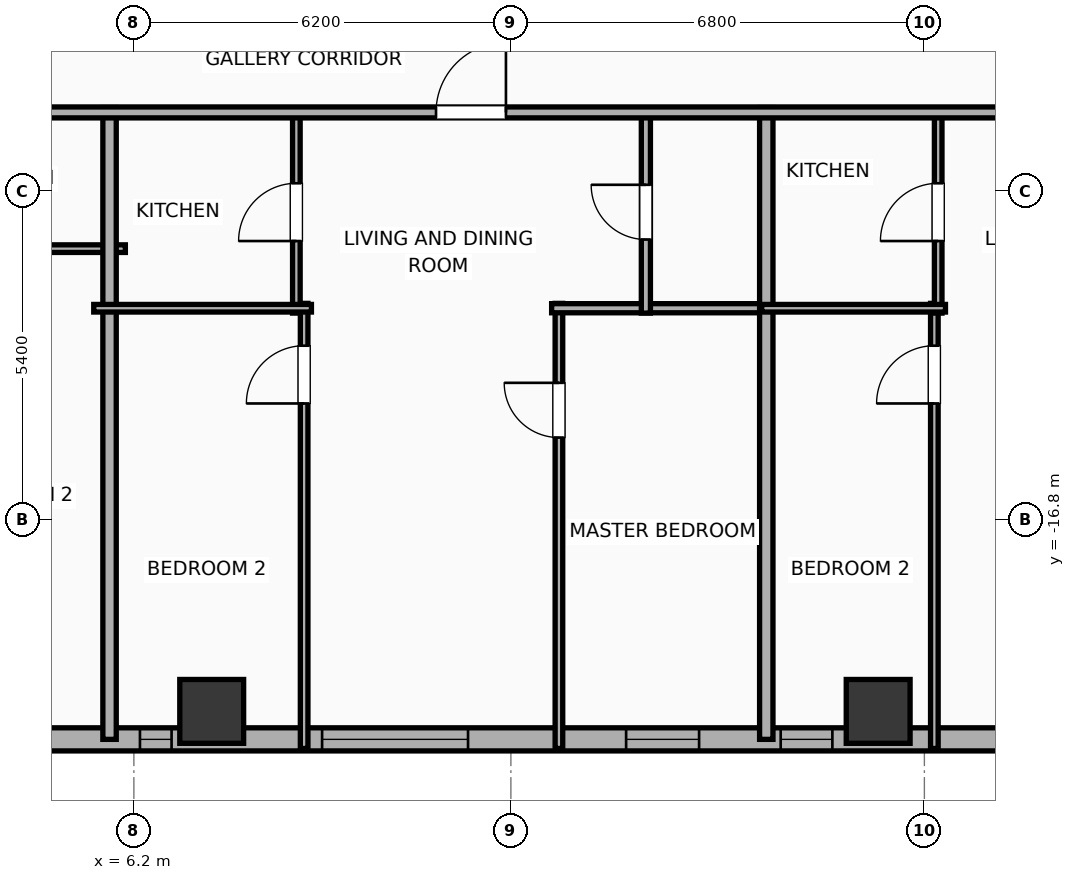
"""IFC4 building model, lengths in metres.
Left out: names, types, materials, properties, quantities, classifications, styles, units other than length and angle.
Written with IfcOpenShell. Run it as: python <this file> out.ifc"""

import sys

from ifc_helpers import new_model, si_unit, direction, frame, frame_2d, origin, origin_2d, place, context, subcontext, project, spatial, rectangle, hollow_rectangle, extrude, element, fill, save


model = new_model("IFC4")
c1 = context("Model", 3, precision=1e-05, world=origin(), true_north=direction((0.0, 1.0)))
c2 = subcontext(c1, "Body", "Model", "MODEL_VIEW")
j1 = project(units=[si_unit("LENGTHUNIT", "METRE"), si_unit("PLANEANGLEUNIT", "RADIAN")], contexts=[c1])
p1 = place(None, origin())
s1 = spatial("IfcSite", under=j1, at=p1, CompositionType="ELEMENT")
p2 = place(p1, origin())
s2 = spatial("IfcBuilding", under=s1, at=p2, CompositionType="ELEMENT")
p3 = place(p2, frame((0.0, 0.0, 105.3)))
s3 = spatial("IfcBuildingStorey", under=s2, at=p3, CompositionType="ELEMENT", Elevation=105.3)
for number, where, z_axis, x_axis in (
    (1, (7.48, -19.95, 0.0), (0.0, 0.0, 1.0), (1.0, 0.0, 0.0)),
    (2, (18.44, -19.95, 0.0), (0.0, 0.0, 1.0), (1.0, 0.0, 0.0)),
):
    element("IfcColumn", number, at=place(p3, frame(where, z_axis=z_axis, x_axis=x_axis)), inside=s3, PredefinedType="COLUMN", context=c2, shape_type="SweptSolid", body=[
        extrude(hollow_rectangle(XDim=1.05, YDim=1.05, WallThickness=0.036, at=origin_2d()), origin(), (0.0, 0.0, 1.0), 3.9),
    ])
p4 = place(p3, frame((29.381, -20.41, 0.0), z_axis=(0.0, 0.0, 1.0), x_axis=(-1.0, 0.0, 0.0)))
e3 = element("IfcWall", 3, at=p4, inside=s3, PredefinedType="ELEMENTEDWALL", context=c2, shape_type="SweptSolid", body=[
    extrude(rectangle(XDim=54.763, YDim=0.38, at=frame_2d((27.381, 0.0))), origin(), (0.0, 0.0, 1.0), 3.65),
])
p5 = place(p4, frame((6.495, 0.0, 0.75)))
e4 = element("IfcOpeningElement", 4, at=p5, cuts=e3, PredefinedType="OPENING", context=c2, shape_type="SweptSolid", body=[
    extrude(rectangle(XDim=2.4, YDim=2.1, at=frame_2d((1.2, 1.05))), frame((0.0, 0.2, 0.0), z_axis=(0.0, -1.0, 0.0), x_axis=(1.0, 0.0, 0.0)), (0.0, 0.0, 1.0), 0.4),
])
p6 = place(p4, frame((17.686, 0.0, 0.75)))
e5 = element("IfcOpeningElement", 5, at=p6, cuts=e3, PredefinedType="OPENING", context=c2, shape_type="SweptSolid", body=[
    extrude(rectangle(XDim=2.4, YDim=2.1, at=frame_2d((1.2, 1.05))), frame((0.0, 0.2, 0.0), z_axis=(0.0, -1.0, 0.0), x_axis=(1.0, 0.0, 0.0)), (0.0, 0.0, 1.0), 0.4),
])
p7 = place(p4, frame((34.677, 0.0, 0.75)))
e6 = element("IfcOpeningElement", 6, at=p7, cuts=e3, PredefinedType="OPENING", context=c2, shape_type="SweptSolid", body=[
    extrude(rectangle(XDim=2.4, YDim=2.1, at=frame_2d((1.2, 1.05))), frame((0.0, 0.2, 0.0), z_axis=(0.0, -1.0, 0.0), x_axis=(1.0, 0.0, 0.0)), (0.0, 0.0, 1.0), 0.4),
])
p8 = place(p4, frame((45.867, 0.0, 0.75)))
e7 = element("IfcOpeningElement", 7, at=p8, cuts=e3, PredefinedType="OPENING", context=c2, shape_type="SweptSolid", body=[
    extrude(rectangle(XDim=2.4, YDim=2.1, at=frame_2d((1.2, 1.05))), frame((0.0, 0.2, 0.0), z_axis=(0.0, -1.0, 0.0), x_axis=(1.0, 0.0, 0.0)), (0.0, 0.0, 1.0), 0.4),
])
p9 = place(p4, frame((52.281, 0.0, 0.75)))
e8 = element("IfcOpeningElement", 8, at=p9, cuts=e3, PredefinedType="OPENING", context=c2, shape_type="SweptSolid", body=[
    extrude(rectangle(XDim=1.2, YDim=2.05, at=frame_2d((0.6, 1.025))), frame((0.0, 0.2, 0.0), z_axis=(0.0, -1.0, 0.0), x_axis=(1.0, 0.0, 0.0)), (0.0, 0.0, 1.0), 0.4),
])
p10 = place(p4, frame((49.641, 0.0, 0.75)))
e9 = element("IfcOpeningElement", 9, at=p10, cuts=e3, PredefinedType="OPENING", context=c2, shape_type="SweptSolid", body=[
    extrude(rectangle(XDim=1.2, YDim=2.05, at=frame_2d((0.6, 1.025))), frame((0.0, 0.2, 0.0), z_axis=(0.0, -1.0, 0.0), x_axis=(1.0, 0.0, 0.0)), (0.0, 0.0, 1.0), 0.4),
])
p11 = place(p4, frame((39.543, 0.0, 0.75)))
e10 = element("IfcOpeningElement", 10, at=p11, cuts=e3, PredefinedType="OPENING", context=c2, shape_type="SweptSolid", body=[
    extrude(rectangle(XDim=1.2, YDim=2.05, at=frame_2d((0.6, 1.025))), frame((0.0, 0.2, 0.0), z_axis=(0.0, -1.0, 0.0), x_axis=(1.0, 0.0, 0.0)), (0.0, 0.0, 1.0), 0.4),
])
p12 = place(p4, frame((44.538, 0.0, 0.75)))
e11 = element("IfcOpeningElement", 11, at=p12, cuts=e3, PredefinedType="OPENING", context=c2, shape_type="SweptSolid", body=[
    extrude(rectangle(XDim=0.52, YDim=2.05, at=frame_2d((0.26, 1.025))), frame((0.0, 0.2, 0.0), z_axis=(0.0, -1.0, 0.0), x_axis=(1.0, 0.0, 0.0)), (0.0, 0.0, 1.0), 0.4),
])
p13 = place(p4, frame((28.206, 0.0, 0.75)))
e12 = element("IfcOpeningElement", 12, at=p13, cuts=e3, PredefinedType="OPENING", context=c2, shape_type="SweptSolid", body=[
    extrude(rectangle(XDim=1.2, YDim=2.05, at=frame_2d((0.6, 1.025))), frame((0.0, 0.2, 0.0), z_axis=(0.0, -1.0, 0.0), x_axis=(1.0, 0.0, 0.0)), (0.0, 0.0, 1.0), 0.4),
])
p14 = place(p4, frame((31.241, 0.0, 0.75)))
e13 = element("IfcOpeningElement", 13, at=p14, cuts=e3, PredefinedType="OPENING", context=c2, shape_type="SweptSolid", body=[
    extrude(rectangle(XDim=0.85, YDim=2.05, at=frame_2d((0.425, 1.025))), frame((0.0, 0.2, 0.0), z_axis=(0.0, -1.0, 0.0), x_axis=(1.0, 0.0, 0.0)), (0.0, 0.0, 1.0), 0.4),
])
p15 = place(p4, frame((24.561, 0.0, 0.75)))
e14 = element("IfcOpeningElement", 14, at=p15, cuts=e3, PredefinedType="OPENING", context=c2, shape_type="SweptSolid", body=[
    extrude(rectangle(XDim=1.2, YDim=2.05, at=frame_2d((0.6, 1.025))), frame((0.0, 0.2, 0.0), z_axis=(0.0, -1.0, 0.0), x_axis=(1.0, 0.0, 0.0)), (0.0, 0.0, 1.0), 0.4),
])
p16 = place(p4, frame((22.561, 0.0, 0.75)))
e15 = element("IfcOpeningElement", 15, at=p16, cuts=e3, PredefinedType="OPENING", context=c2, shape_type="SweptSolid", body=[
    extrude(rectangle(XDim=0.52, YDim=2.05, at=frame_2d((0.26, 1.025))), frame((0.0, 0.2, 0.0), z_axis=(0.0, -1.0, 0.0), x_axis=(1.0, 0.0, 0.0)), (0.0, 0.0, 1.0), 0.4),
])
p17 = place(p4, frame((13.886, 0.0, 0.75)))
e16 = element("IfcOpeningElement", 16, at=p17, cuts=e3, PredefinedType="OPENING", context=c2, shape_type="SweptSolid", body=[
    extrude(rectangle(XDim=1.2, YDim=2.05, at=frame_2d((0.6, 1.025))), frame((0.0, 0.2, 0.0), z_axis=(0.0, -1.0, 0.0), x_axis=(1.0, 0.0, 0.0)), (0.0, 0.0, 1.0), 0.4),
])
p18 = place(p4, frame((11.694, 0.0, 0.75)))
e17 = element("IfcOpeningElement", 17, at=p18, cuts=e3, PredefinedType="OPENING", context=c2, shape_type="SweptSolid", body=[
    extrude(rectangle(XDim=0.85, YDim=2.05, at=frame_2d((0.425, 1.025))), frame((0.0, 0.2, 0.0), z_axis=(0.0, -1.0, 0.0), x_axis=(1.0, 0.0, 0.0)), (0.0, 0.0, 1.0), 0.4),
])
p19 = place(p4, frame((3.286, 0.0, 0.75)))
e18 = element("IfcOpeningElement", 18, at=p19, cuts=e3, PredefinedType="OPENING", context=c2, shape_type="SweptSolid", body=[
    extrude(rectangle(XDim=1.2, YDim=2.05, at=frame_2d((0.6, 1.025))), frame((0.0, 0.2, 0.0), z_axis=(0.0, -1.0, 0.0), x_axis=(1.0, 0.0, 0.0)), (0.0, 0.0, 1.0), 0.4),
])
p20 = place(p4, frame((0.816, 0.0, 0.75)))
e19 = element("IfcOpeningElement", 19, at=p20, cuts=e3, PredefinedType="OPENING", context=c2, shape_type="SweptSolid", body=[
    extrude(rectangle(XDim=1.2, YDim=2.05, at=frame_2d((0.6, 1.025))), frame((0.0, 0.2, 0.0), z_axis=(0.0, -1.0, 0.0), x_axis=(1.0, 0.0, 0.0)), (0.0, 0.0, 1.0), 0.4),
])
p21 = place(p3, frame((2.56, -12.34, 0.0), z_axis=(0.0, 0.0, 1.0), x_axis=(1.0, 0.0, 0.0)))
e20 = element("IfcWall", 20, at=p21, inside=s3, PredefinedType="PARTITIONING", context=c2, shape_type="SweptSolid", body=[
    extrude(rectangle(XDim=3.5, YDim=0.125, at=frame_2d((1.75, 0.0))), origin(), (0.0, 0.0, 1.0), 3.65),
])
p22 = place(p3, frame((5.8, -20.41, 0.0), z_axis=(0.0, 0.0, 1.0), x_axis=(0.0, 1.0, 0.0)))
e21 = element("IfcWall", 21, at=p22, inside=s3, PredefinedType="PARTITIONING", context=c2, shape_type="SweptSolid", body=[
    extrude(rectangle(XDim=10.39, YDim=0.22, at=frame_2d((5.195, 0.0))), origin(), (0.0, 0.0, 1.0), 3.04),
])
p23 = place(p3, frame((9.0, -20.56, 0.0), z_axis=(0.0, 0.0, 1.0), x_axis=(0.0, 1.0, 0.0)))
e22 = element("IfcWall", 22, at=p23, inside=s3, PredefinedType="PARTITIONING", context=c2, shape_type="SweptSolid", body=[
    extrude(rectangle(XDim=7.32, YDim=0.125, at=frame_2d((3.66, 0.0))), origin(), (0.0, 0.0, 1.0), 3.65),
])
p24 = place(p23, frame((5.674, 0.0, 0.0)))
e23 = element("IfcOpeningElement", 23, at=p24, cuts=e22, PredefinedType="OPENING", context=c2, shape_type="SweptSolid", body=[
    extrude(rectangle(XDim=0.95, YDim=2.05, at=frame_2d((0.475, 1.025))), frame((0.0, 0.073, 0.0), z_axis=(0.0, -1.0, 0.0), x_axis=(1.0, 0.0, 0.0)), (0.0, 0.0, 1.0), 0.145),
])
p25 = place(p3, frame((13.19, -20.56, 0.0), z_axis=(0.0, 0.0, 1.0), x_axis=(0.0, 1.0, 0.0)))
e24 = element("IfcWall", 24, at=p25, inside=s3, PredefinedType="PARTITIONING", context=c2, shape_type="SweptSolid", body=[
    extrude(rectangle(XDim=7.32, YDim=0.125, at=frame_2d((3.66, 0.0))), origin(), (0.0, 0.0, 1.0), 3.65),
])
p26 = place(p25, frame((5.113, 0.0, 0.0)))
e25 = element("IfcOpeningElement", 25, at=p26, cuts=e24, PredefinedType="OPENING", context=c2, shape_type="SweptSolid", body=[
    extrude(rectangle(XDim=0.9, YDim=2.05, at=frame_2d((0.45, 1.025))), frame((0.0, 0.073, 0.0), z_axis=(0.0, -1.0, 0.0), x_axis=(1.0, 0.0, 0.0)), (0.0, 0.0, 1.0), 0.145),
])
p27 = place(p3, frame((13.07, -13.32, 0.0), z_axis=(0.0, 0.0, 1.0), x_axis=(1.0, 0.0, 0.0)))
e26 = element("IfcWall", 26, at=p27, inside=s3, PredefinedType="PLUMBINGWALL", context=c2, shape_type="SweptSolid", body=[
    extrude(rectangle(XDim=3.605, YDim=0.15, at=frame_2d((1.802, 0.0))), origin(), (0.0, 0.0, 1.0), 3.65),
])
p28 = place(p3, frame((8.872, -13.4, 0.0), z_axis=(0.0, 0.0, 1.0), x_axis=(0.0, 1.0, 0.0)))
e27 = element("IfcWall", 27, at=p28, inside=s3, PredefinedType="PARTITIONING", context=c2, shape_type="SweptSolid", body=[
    extrude(rectangle(XDim=3.32, YDim=0.125, at=frame_2d((1.66, 0.0))), origin(), (0.0, 0.0, 1.0), 3.65),
])
p29 = place(p28, frame((1.185, 0.0, 0.0)))
e28 = element("IfcOpeningElement", 28, at=p29, cuts=e27, PredefinedType="OPENING", context=c2, shape_type="SweptSolid", body=[
    extrude(rectangle(XDim=0.95, YDim=2.05, at=frame_2d((0.475, 1.025))), frame((0.0, 0.073, 0.0), z_axis=(0.0, -1.0, 0.0), x_axis=(1.0, 0.0, 0.0)), (0.0, 0.0, 1.0), 0.145),
])
p30 = place(p3, frame((5.54, -13.32, 0.0), z_axis=(0.0, 0.0, 1.0), x_axis=(1.0, 0.0, 0.0)))
e29 = element("IfcWall", 29, at=p30, inside=s3, PredefinedType="PARTITIONING", context=c2, shape_type="SweptSolid", body=[
    extrude(rectangle(XDim=3.58, YDim=0.125, at=frame_2d((1.79, 0.0))), origin(), (0.0, 0.0, 1.0), 3.65),
])
p31 = place(p3, frame((14.62, -13.4, 0.0), z_axis=(0.0, 0.0, 1.0), x_axis=(0.0, 1.0, 0.0)))
e30 = element("IfcWall", 30, at=p31, inside=s3, PredefinedType="PLUMBINGWALL", context=c2, shape_type="SweptSolid", body=[
    extrude(rectangle(XDim=3.32, YDim=0.15, at=frame_2d((1.66, 0.0))), origin(), (0.0, 0.0, 1.0), 3.65),
])
p32 = place(p31, frame((1.21, 0.0, 0.0)))
e31 = element("IfcOpeningElement", 31, at=p32, cuts=e30, PredefinedType="OPENING", context=c2, shape_type="SweptSolid", body=[
    extrude(rectangle(XDim=0.9, YDim=2.05, at=frame_2d((0.45, 1.025))), frame((0.0, 0.085, 0.0), z_axis=(0.0, -1.0, 0.0), x_axis=(1.0, 0.0, 0.0)), (0.0, 0.0, 1.0), 0.17),
])
p33 = place(p3, frame((16.6, -20.41, 0.0), z_axis=(0.0, 0.0, 1.0), x_axis=(0.0, 1.0, 0.0)))
e32 = element("IfcWall", 32, at=p33, inside=s3, PredefinedType="PARTITIONING", context=c2, shape_type="SweptSolid", body=[
    extrude(rectangle(XDim=10.39, YDim=0.22, at=frame_2d((5.195, 0.0))), origin(), (0.0, 0.0, 1.0), 3.65),
])
p34 = place(p3, frame((19.364, -20.56, 0.0), z_axis=(0.0, 0.0, 1.0), x_axis=(0.0, 1.0, 0.0)))
e33 = element("IfcWall", 33, at=p34, inside=s3, PredefinedType="PARTITIONING", context=c2, shape_type="SweptSolid", body=[
    extrude(rectangle(XDim=7.32, YDim=0.125, at=frame_2d((3.66, 0.0))), origin(), (0.0, 0.0, 1.0), 3.65),
])
p35 = place(p34, frame((5.674, 0.0, 0.0)))
e34 = element("IfcOpeningElement", 34, at=p35, cuts=e33, PredefinedType="OPENING", context=c2, shape_type="SweptSolid", body=[
    extrude(rectangle(XDim=0.95, YDim=2.05, at=frame_2d((0.475, 1.025))), frame((0.0, 0.073, 0.0), z_axis=(0.0, -1.0, 0.0), x_axis=(1.0, 0.0, 0.0)), (0.0, 0.0, 1.0), 0.145),
])
p36 = place(p3, frame((19.427, -13.4, 0.0), z_axis=(0.0, 0.0, 1.0), x_axis=(0.0, 1.0, 0.0)))
e35 = element("IfcWall", 35, at=p36, inside=s3, PredefinedType="PARTITIONING", context=c2, shape_type="SweptSolid", body=[
    extrude(rectangle(XDim=3.32, YDim=0.125, at=frame_2d((1.66, 0.0))), origin(), (0.0, 0.0, 1.0), 3.65),
])
p37 = place(p36, frame((1.185, 0.0, 0.0)))
e36 = element("IfcOpeningElement", 36, at=p37, cuts=e35, PredefinedType="OPENING", context=c2, shape_type="SweptSolid", body=[
    extrude(rectangle(XDim=0.95, YDim=2.05, at=frame_2d((0.475, 1.025))), frame((0.0, 0.073, 0.0), z_axis=(0.0, -1.0, 0.0), x_axis=(1.0, 0.0, 0.0)), (0.0, 0.0, 1.0), 0.145),
])
p38 = place(p3, frame((16.525, -13.32, 0.0), z_axis=(0.0, 0.0, 1.0), x_axis=(1.0, 0.0, 0.0)))
e37 = element("IfcWall", 37, at=p38, inside=s3, PredefinedType="PARTITIONING", context=c2, shape_type="SweptSolid", body=[
    extrude(rectangle(XDim=3.022, YDim=0.125, at=frame_2d((1.511, 0.0))), origin(), (0.0, 0.0, 1.0), 3.65),
])
p39 = place(p3, frame((-29.21, -10.1, 0.0), z_axis=(0.0, 0.0, 1.0), x_axis=(1.0, 0.0, 0.0)))
e38 = element("IfcWall", 38, at=p39, inside=s3, PredefinedType="PARTITIONING", context=c2, shape_type="SweptSolid", body=[
    extrude(rectangle(XDim=62.42, YDim=0.18, at=frame_2d((31.21, 0.0))), origin(), (0.0, 0.0, 1.0), 3.65),
])
p40 = place(p39, frame((3.033, 0.0, 0.0)))
e39 = element("IfcOpeningElement", 39, at=p40, cuts=e38, PredefinedType="OPENING", context=c2, shape_type="SweptSolid", body=[
    extrude(rectangle(XDim=0.9, YDim=2.05, at=frame_2d((0.45, 1.025))), frame((0.0, 0.1, 0.0), z_axis=(0.0, -1.0, 0.0), x_axis=(1.0, 0.0, 0.0)), (0.0, 0.0, 1.0), 0.2),
])
p41 = place(p39, frame((9.768, 0.0, 0.0)))
e40 = element("IfcOpeningElement", 40, at=p41, cuts=e38, PredefinedType="OPENING", context=c2, shape_type="SweptSolid", body=[
    extrude(rectangle(XDim=0.9, YDim=2.05, at=frame_2d((0.45, 1.025))), frame((0.0, 0.1, 0.0), z_axis=(0.0, -1.0, 0.0), x_axis=(1.0, 0.0, 0.0)), (0.0, 0.0, 1.0), 0.2),
])
p42 = place(p39, frame((18.65, 0.0, 0.0)))
e41 = element("IfcOpeningElement", 41, at=p42, cuts=e38, PredefinedType="OPENING", context=c2, shape_type="SweptSolid", body=[
    extrude(rectangle(XDim=1.15, YDim=2.05, at=frame_2d((0.575, 1.025))), frame((0.0, 0.1, 0.0), z_axis=(0.0, -1.0, 0.0), x_axis=(1.0, 0.0, 0.0)), (0.0, 0.0, 1.0), 0.2),
])
p43 = place(p39, frame((29.212, 0.0, 0.0)))
e42 = element("IfcOpeningElement", 42, at=p43, cuts=e38, PredefinedType="OPENING", context=c2, shape_type="SweptSolid", body=[
    extrude(rectangle(XDim=1.15, YDim=2.05, at=frame_2d((0.575, 1.025))), frame((0.0, 0.1, 0.0), z_axis=(0.0, -1.0, 0.0), x_axis=(1.0, 0.0, 0.0)), (0.0, 0.0, 1.0), 0.2),
])
p44 = place(p39, frame((40.379, 0.0, 0.0)))
e43 = element("IfcOpeningElement", 43, at=p44, cuts=e38, PredefinedType="OPENING", context=c2, shape_type="SweptSolid", body=[
    extrude(rectangle(XDim=1.15, YDim=2.05, at=frame_2d((0.575, 1.025))), frame((0.0, 0.1, 0.0), z_axis=(0.0, -1.0, 0.0), x_axis=(1.0, 0.0, 0.0)), (0.0, 0.0, 1.0), 0.2),
])
p45 = place(p39, frame((50.959, 0.0, 0.0)))
e44 = element("IfcOpeningElement", 44, at=p45, cuts=e38, PredefinedType="OPENING", context=c2, shape_type="SweptSolid", body=[
    extrude(rectangle(XDim=1.15, YDim=2.05, at=frame_2d((0.575, 1.025))), frame((0.0, 0.1, 0.0), z_axis=(0.0, -1.0, 0.0), x_axis=(1.0, 0.0, 0.0)), (0.0, 0.0, 1.0), 0.2),
])
p46 = place(p39, frame((59.117, 0.0, 0.0)))
e45 = element("IfcOpeningElement", 45, at=p46, cuts=e38, PredefinedType="OPENING", context=c2, shape_type="SweptSolid", body=[
    extrude(rectangle(XDim=0.9, YDim=2.05, at=frame_2d((0.45, 1.025))), frame((0.0, 0.1, 0.0), z_axis=(0.0, -1.0, 0.0), x_axis=(1.0, 0.0, 0.0)), (0.0, 0.0, 1.0), 0.2),
])
p47 = place(p6, origin())
e46 = element("IfcWindow", 46, at=p47, inside=s3, PartitioningType="SINGLE_PANEL", PredefinedType="WINDOW", context=c2, shape_type="SweptSolid", body=[
    extrude(rectangle(XDim=2.4, YDim=2.1, at=frame_2d((1.2, 1.05))), frame((0.0, 0.03, 0.0), z_axis=(0.0, -1.0, 0.0), x_axis=(1.0, 0.0, 0.0)), (0.0, 0.0, 1.0), 0.06),
])
fill(e5, e46)
p48 = place(p16, origin())
e47 = element("IfcWindow", 47, at=p48, inside=s3, PartitioningType="SINGLE_PANEL", PredefinedType="WINDOW", context=c2, shape_type="SweptSolid", body=[
    extrude(rectangle(XDim=0.52, YDim=2.05, at=frame_2d((0.26, 1.025))), frame((0.0, 0.03, 0.0), z_axis=(0.0, -1.0, 0.0), x_axis=(1.0, 0.0, 0.0)), (0.0, 0.0, 1.0), 0.06),
])
fill(e15, e47)
p49 = place(p17, origin())
e48 = element("IfcWindow", 48, at=p49, inside=s3, PartitioningType="SINGLE_PANEL", PredefinedType="WINDOW", context=c2, shape_type="SweptSolid", body=[
    extrude(rectangle(XDim=1.2, YDim=2.05, at=frame_2d((0.6, 1.025))), frame((0.0, 0.03, 0.0), z_axis=(0.0, -1.0, 0.0), x_axis=(1.0, 0.0, 0.0)), (0.0, 0.0, 1.0), 0.06),
])
fill(e16, e48)
p50 = place(p18, origin())
e49 = element("IfcWindow", 49, at=p50, inside=s3, PartitioningType="SINGLE_PANEL", PredefinedType="WINDOW", context=c2, shape_type="SweptSolid", body=[
    extrude(rectangle(XDim=0.85, YDim=2.05, at=frame_2d((0.425, 1.025))), frame((0.0, 0.03, 0.0), z_axis=(0.0, -1.0, 0.0), x_axis=(1.0, 0.0, 0.0)), (0.0, 0.0, 1.0), 0.06),
])
fill(e17, e49)
p51 = place(p24, origin())
e50 = element("IfcDoor", 50, at=p51, inside=s3, OperationType="SINGLE_SWING_LEFT", PredefinedType="DOOR", context=c2, shape_type="SweptSolid", body=[
    extrude(rectangle(XDim=0.95, YDim=2.05, at=frame_2d((0.475, 1.025))), frame((0.0, 0.025, 0.0), z_axis=(0.0, -1.0, 0.0), x_axis=(1.0, 0.0, 0.0)), (0.0, 0.0, 1.0), 0.05),
])
fill(e23, e50)
p52 = place(p26, origin())
e51 = element("IfcDoor", 51, at=p52, inside=s3, OperationType="SINGLE_SWING_RIGHT", PredefinedType="DOOR", context=c2, shape_type="SweptSolid", body=[
    extrude(rectangle(XDim=0.9, YDim=2.05, at=frame_2d((0.45, 1.025))), frame((0.0, 0.025, 0.0), z_axis=(0.0, -1.0, 0.0), x_axis=(1.0, 0.0, 0.0)), (0.0, 0.0, 1.0), 0.05),
])
fill(e25, e51)
p53 = place(p29, origin())
e52 = element("IfcDoor", 52, at=p53, inside=s3, OperationType="SINGLE_SWING_LEFT", PredefinedType="DOOR", context=c2, shape_type="SweptSolid", body=[
    extrude(rectangle(XDim=0.95, YDim=2.05, at=frame_2d((0.475, 1.025))), frame((0.0, 0.025, 0.0), z_axis=(0.0, -1.0, 0.0), x_axis=(1.0, 0.0, 0.0)), (0.0, 0.0, 1.0), 0.05),
])
fill(e28, e52)
p54 = place(p32, origin())
e53 = element("IfcDoor", 53, at=p54, inside=s3, OperationType="SINGLE_SWING_RIGHT", PredefinedType="DOOR", context=c2, shape_type="SweptSolid", body=[
    extrude(rectangle(XDim=0.9, YDim=2.05, at=frame_2d((0.45, 1.025))), frame((0.0, 0.025, 0.0), z_axis=(0.0, -1.0, 0.0), x_axis=(1.0, 0.0, 0.0)), (0.0, 0.0, 1.0), 0.05),
])
fill(e31, e53)
p55 = place(p35, origin())
e54 = element("IfcDoor", 54, at=p55, inside=s3, OperationType="SINGLE_SWING_LEFT", PredefinedType="DOOR", context=c2, shape_type="SweptSolid", body=[
    extrude(rectangle(XDim=0.95, YDim=2.05, at=frame_2d((0.475, 1.025))), frame((0.0, 0.025, 0.0), z_axis=(0.0, -1.0, 0.0), x_axis=(1.0, 0.0, 0.0)), (0.0, 0.0, 1.0), 0.05),
])
fill(e34, e54)
p56 = place(p37, origin())
e55 = element("IfcDoor", 55, at=p56, inside=s3, OperationType="SINGLE_SWING_LEFT", PredefinedType="DOOR", context=c2, shape_type="SweptSolid", body=[
    extrude(rectangle(XDim=0.95, YDim=2.05, at=frame_2d((0.475, 1.025))), frame((0.0, 0.025, 0.0), z_axis=(0.0, -1.0, 0.0), x_axis=(1.0, 0.0, 0.0)), (0.0, 0.0, 1.0), 0.05),
])
fill(e36, e55)
p57 = place(p44, origin())
e56 = element("IfcDoor", 56, at=p57, inside=s3, OperationType="SINGLE_SWING_RIGHT", PredefinedType="DOOR", context=c2, shape_type="SweptSolid", body=[
    extrude(rectangle(XDim=1.15, YDim=2.05, at=frame_2d((0.575, 1.025))), frame((0.0, 0.025, 0.0), z_axis=(0.0, -1.0, 0.0), x_axis=(1.0, 0.0, 0.0)), (0.0, 0.0, 1.0), 0.05),
])
fill(e43, e56)
save(model, sys.argv[1])
